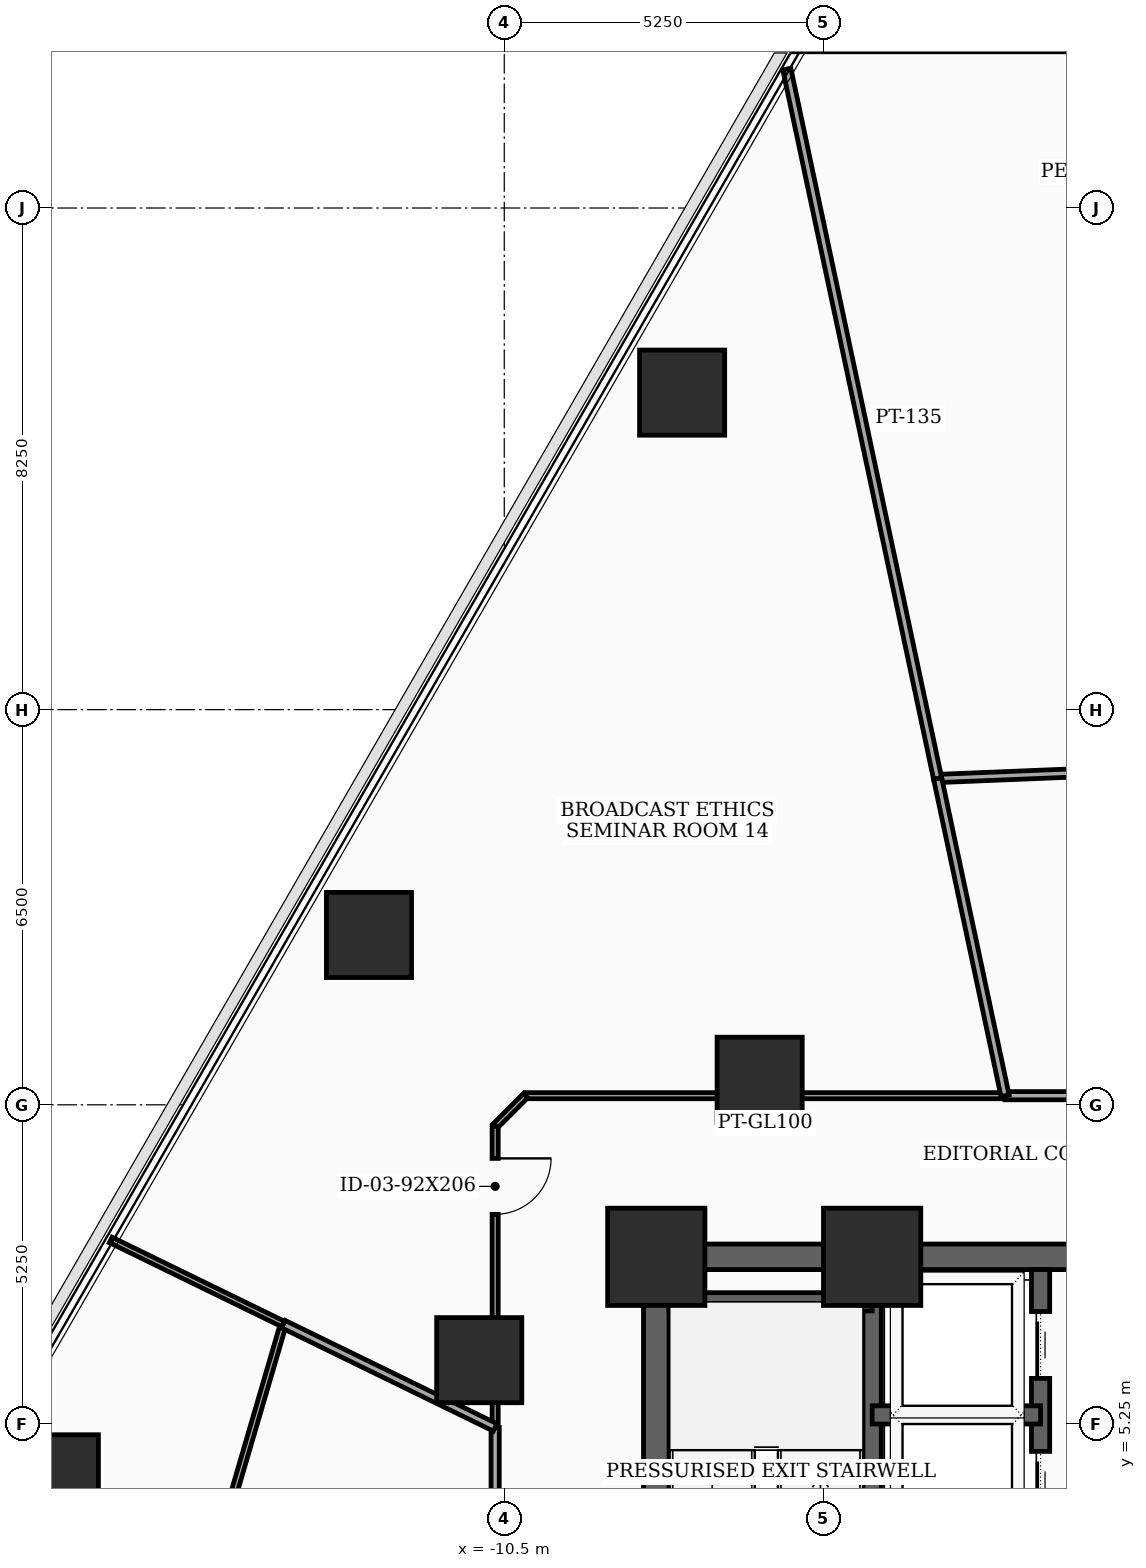
"""IFC4 building model, lengths in metres.
Left out: names, types, materials, properties, quantities, classifications, styles, units other than length and angle.
Written with IfcOpenShell. Run it as: python <this file> out.ifc"""

import sys

from ifc_helpers import new_model, si_unit, direction, frame, frame_2d, origin, origin_2d, place, context, subcontext, project, spatial, rectangle, extrude, element, fill, save


model = new_model("IFC4")
c1 = context("Model", 3, precision=1e-05, world=origin(), true_north=direction((0.0, 1.0)))
c2 = subcontext(c1, "Body", "Model", "MODEL_VIEW")
j1 = project(units=[si_unit("LENGTHUNIT", "METRE"), si_unit("PLANEANGLEUNIT", "RADIAN")], contexts=[c1])
p1 = place(None, origin())
s1 = spatial("IfcSite", under=j1, at=p1, CompositionType="ELEMENT")
p2 = place(p1, origin())
s2 = spatial("IfcBuilding", under=s1, at=p2, CompositionType="ELEMENT")
p3 = place(p2, frame((0.0, 0.0, 51.9)))
s3 = spatial("IfcBuildingStorey", under=s2, at=p3, CompositionType="ELEMENT", Elevation=51.9)
for number, where, z_axis, x_axis in (
    (1, (-4.45, 8.0, 0.0), (0.0, 0.0, 1.0), (1.0, 0.0, 0.0)),
    (2, (-8.0, 8.0, 0.0), (0.0, 0.0, 1.0), (1.0, 0.0, 0.0)),
):
    element("IfcColumn", number, at=place(p3, frame(where, z_axis=z_axis, x_axis=x_axis)), inside=s3, PredefinedType="COLUMN", context=c2, shape_type="SweptSolid", body=[
        extrude(rectangle(XDim=1.6, YDim=1.6, at=origin_2d()), origin(), (0.0, 0.0, 1.0), 3.7),
    ])
for number, where, z_axis, x_axis in (
    (3, (-6.3, 10.912, 0.0), (0.0, 0.0, 1.0), (1.0, 0.0, 0.0)),
    (4, (-10.912, 6.3, 0.0), (0.0, 0.0, 1.0), (1.0, 0.0, 0.0)),
    (5, (-7.575, 22.213, 0.0), (0.0, 0.0, 1.0), (1.0, 0.0, 0.0)),
    (6, (-12.725, 13.293, 0.0), (0.0, 0.0, 1.0), (1.0, 0.0, 0.0)),
    (7, (-17.875, 4.373, 0.0), (0.0, 0.0, 1.0), (1.0, 0.0, 0.0)),
):
    element("IfcColumn", number, at=place(p3, frame(where, z_axis=z_axis, x_axis=x_axis)), inside=s3, PredefinedType="COLUMN", context=c2, shape_type="SweptSolid", body=[
        extrude(rectangle(XDim=1.4, YDim=1.4, at=origin_2d()), origin(), (0.0, 0.0, 1.0), 3.7),
    ])
p4 = place(p3, frame((-8.0, -8.0, 0.0), z_axis=(0.0, 0.0, 1.0), x_axis=(0.0, 1.0, 0.0)))
e8 = element("IfcWall", 8, at=p4, inside=s3, PredefinedType="SHEAR", context=c2, shape_type="SweptSolid", body=[
    extrude(rectangle(XDim=16.0, YDim=0.42, at=frame_2d((8.0, 0.0))), origin(), (0.0, 0.0, 1.0), 3.5),
])
p5 = place(p4, frame((1.002, 0.0, 0.0)))
e9 = element("IfcOpeningElement", 9, at=p5, cuts=e8, PredefinedType="OPENING", context=c2, shape_type="SweptSolid", body=[
    extrude(rectangle(XDim=0.85, YDim=2.02, at=frame_2d((0.425, 1.01))), frame((0.0, 0.22, 0.0), z_axis=(0.0, -1.0, 0.0), x_axis=(1.0, 0.0, 0.0)), (0.0, 0.0, 1.0), 0.44),
])
p6 = place(p4, frame((5.35, 0.0, 0.0)))
e10 = element("IfcOpeningElement", 10, at=p6, cuts=e8, PredefinedType="OPENING", context=c2, shape_type="SweptSolid", body=[
    extrude(rectangle(XDim=1.05, YDim=2.15, at=frame_2d((0.525, 1.075))), frame((0.0, 0.22, 0.0), z_axis=(0.0, -1.0, 0.0), x_axis=(1.0, 0.0, 0.0)), (0.0, 0.0, 1.0), 0.44),
])
p7 = place(p3, frame((-8.0, 8.0, 0.0), z_axis=(0.0, 0.0, 1.0), x_axis=(1.0, 0.0, 0.0)))
e11 = element("IfcWall", 11, at=p7, inside=s3, PredefinedType="SHEAR", context=c2, shape_type="SweptSolid", body=[
    extrude(rectangle(XDim=16.0, YDim=0.42, at=frame_2d((8.0, 0.0))), origin(), (0.0, 0.0, 1.0), 3.5),
])
p8 = place(p7, frame((7.1, 0.0, 0.0)))
e12 = element("IfcOpeningElement", 12, at=p8, cuts=e11, PredefinedType="OPENING", context=c2, shape_type="SweptSolid", body=[
    extrude(rectangle(XDim=1.8, YDim=2.15, at=frame_2d((0.9, 1.075))), frame((0.0, 0.22, 0.0), z_axis=(0.0, -1.0, 0.0), x_axis=(1.0, 0.0, 0.0)), (0.0, 0.0, 1.0), 0.44),
])
p9 = place(p3, frame((-4.45, -7.79, 0.0), z_axis=(0.0, 0.0, 1.0), x_axis=(0.0, 1.0, 0.0)))
e13 = element("IfcWall", 13, at=p9, inside=s3, PredefinedType="SHEAR", context=c2, shape_type="SweptSolid", body=[
    extrude(rectangle(XDim=15.58, YDim=0.3, at=frame_2d((7.79, 0.0))), origin(), (0.0, 0.0, 1.0), 3.5),
])
p10 = place(p3, frame((-7.79, 7.26, 0.0), z_axis=(0.0, 0.0, 1.0), x_axis=(1.0, 0.0, 0.0)))
e14 = element("IfcWall", 14, at=p10, inside=s3, PredefinedType="SHEAR", context=c2, shape_type="SweptSolid", body=[
    extrude(rectangle(XDim=3.34, YDim=0.3, at=frame_2d((1.67, 0.0))), origin(), (0.0, 0.0, 1.0), 3.5),
])
p11 = place(p3, frame((-1.68, -4.85, 0.0), z_axis=(0.0, 0.0, 1.0), x_axis=(0.0, 1.0, 0.0)))
e15 = element("IfcWall", 15, at=p11, inside=s3, PredefinedType="SHEAR", context=c2, shape_type="SweptSolid", body=[
    extrude(rectangle(XDim=12.64, YDim=0.3, at=frame_2d((6.32, 0.0))), origin(), (0.0, 0.0, 1.0), 3.5),
])
p12 = place(p11, frame((3.95, 0.0, 0.0)))
e16 = element("IfcOpeningElement", 16, at=p12, cuts=e15, PredefinedType="OPENING", context=c2, shape_type="SweptSolid", body=[
    extrude(rectangle(XDim=1.1, YDim=2.1, at=frame_2d((0.55, 1.05))), frame((0.0, 0.16, 0.0), z_axis=(0.0, -1.0, 0.0), x_axis=(1.0, 0.0, 0.0)), (0.0, 0.0, 1.0), 0.32),
])
p13 = place(p11, frame((6.25, 0.0, 0.0)))
e17 = element("IfcOpeningElement", 17, at=p13, cuts=e15, PredefinedType="OPENING", context=c2, shape_type="SweptSolid", body=[
    extrude(rectangle(XDim=1.1, YDim=2.1, at=frame_2d((0.55, 1.05))), frame((0.0, 0.16, 0.0), z_axis=(0.0, -1.0, 0.0), x_axis=(1.0, 0.0, 0.0)), (0.0, 0.0, 1.0), 0.32),
])
p14 = place(p11, frame((8.55, 0.0, 0.0)))
e18 = element("IfcOpeningElement", 18, at=p14, cuts=e15, PredefinedType="OPENING", context=c2, shape_type="SweptSolid", body=[
    extrude(rectangle(XDim=1.1, YDim=2.1, at=frame_2d((0.55, 1.05))), frame((0.0, 0.16, 0.0), z_axis=(0.0, -1.0, 0.0), x_axis=(1.0, 0.0, 0.0)), (0.0, 0.0, 1.0), 0.32),
])
p15 = place(p11, frame((10.85, 0.0, 0.0)))
e19 = element("IfcOpeningElement", 19, at=p15, cuts=e15, PredefinedType="OPENING", context=c2, shape_type="SweptSolid", body=[
    extrude(rectangle(XDim=1.1, YDim=2.1, at=frame_2d((0.55, 1.05))), frame((0.0, 0.16, 0.0), z_axis=(0.0, -1.0, 0.0), x_axis=(1.0, 0.0, 0.0)), (0.0, 0.0, 1.0), 0.32),
])
p16 = place(p11, frame((0.45, 0.0, 0.0)))
e20 = element("IfcOpeningElement", 20, at=p16, cuts=e15, PredefinedType="OPENING", context=c2, shape_type="SweptSolid", body=[
    extrude(rectangle(XDim=0.85, YDim=2.02, at=frame_2d((0.425, 1.01))), frame((0.0, 0.16, 0.0), z_axis=(0.0, -1.0, 0.0), x_axis=(1.0, 0.0, 0.0)), (0.0, 0.0, 1.0), 0.32),
])
p17 = place(p11, frame((2.05, 0.0, 0.0)))
e21 = element("IfcOpeningElement", 21, at=p17, cuts=e15, PredefinedType="OPENING", context=c2, shape_type="SweptSolid", body=[
    extrude(rectangle(XDim=0.85, YDim=2.02, at=frame_2d((0.425, 1.01))), frame((0.0, 0.16, 0.0), z_axis=(0.0, -1.0, 0.0), x_axis=(1.0, 0.0, 0.0)), (0.0, 0.0, 1.0), 0.32),
])
p18 = place(p3, frame((-4.45, 5.4, 0.0), z_axis=(0.0, 0.0, 1.0), x_axis=(1.0, 0.0, 0.0)))
e22 = element("IfcWall", 22, at=p18, inside=s3, PredefinedType="SHEAR", context=c2, shape_type="SweptSolid", body=[
    extrude(rectangle(XDim=2.77, YDim=0.3, at=frame_2d((1.385, 0.0))), origin(), (0.0, 0.0, 1.0), 3.5),
])
p19 = place(p3, frame((1.715, 10.65, 0.0), z_axis=(0.0, 0.0, 1.0), x_axis=(-1.0, 0.0, 0.0)))
e23 = element("IfcWall", 23, at=p19, inside=s3, PredefinedType="PARTITIONING", context=c2, shape_type="SweptSolid", body=[
    extrude(rectangle(XDim=3.979, YDim=0.135, at=frame_2d((1.99, 0.0))), origin(), (0.0, 0.0, 1.0), 2.785),
])
p20 = place(p3, frame((-10.65, 5.194, 0.0), z_axis=(0.0, 0.0, 1.0), x_axis=(0.0, -1.0, 0.0)))
e24 = element("IfcWall", 24, at=p20, inside=s3, PredefinedType="PARTITIONING", context=c2, shape_type="SweptSolid", body=[
    extrude(rectangle(XDim=6.909, YDim=0.135, at=frame_2d((3.455, 0.0))), origin(), (0.0, 0.0, 1.0), 2.785),
])
p21 = place(p20, frame((2.979, 0.0, 0.0)))
e25 = element("IfcOpeningElement", 25, at=p21, cuts=e24, PredefinedType="OPENING", context=c2, shape_type="SweptSolid", body=[
    extrude(rectangle(XDim=0.95, YDim=2.1, at=frame_2d((0.475, 1.05))), frame((0.0, 0.077, 0.0), z_axis=(0.0, -1.0, 0.0), x_axis=(1.0, 0.0, 0.0)), (0.0, 0.0, 1.0), 0.155),
])
p22 = place(p3, frame((-2.264, 10.65, 0.0), z_axis=(0.0, 0.0, 1.0), x_axis=(-1.0, 0.0, 0.0)))
e26 = element("IfcWall", 26, at=p22, inside=s3, PredefinedType="MOVABLE", context=c2, shape_type="SweptSolid", body=[
    extrude(rectangle(XDim=7.886, YDim=0.1, at=frame_2d((3.943, 0.0))), origin(), (0.0, 0.0, 1.0), 2.085),
])
p23 = place(p3, frame((-10.15, 10.65, 0.0), z_axis=(0.0, 0.0, 1.0), x_axis=(-0.707106781187, -0.707106781187, 0.0)))
e27 = element("IfcWall", 27, at=p23, inside=s3, PredefinedType="MOVABLE", context=c2, shape_type="SweptSolid", body=[
    extrude(rectangle(XDim=0.707, YDim=0.1, at=frame_2d((0.354, 0.0))), origin(), (0.0, 0.0, 1.0), 3.5),
])
p24 = place(p3, frame((-10.65, 10.15, 0.0), z_axis=(0.0, 0.0, 1.0), x_axis=(0.0, -1.0, 0.0)))
e28 = element("IfcWall", 28, at=p24, inside=s3, PredefinedType="MOVABLE", context=c2, shape_type="SweptSolid", body=[
    extrude(rectangle(XDim=4.956, YDim=0.1, at=frame_2d((2.478, 0.0))), origin(), (0.0, 0.0, 1.0), 2.085),
])
p25 = place(p24, frame((0.531, 0.0, 0.0)))
e29 = element("IfcOpeningElement", 29, at=p25, cuts=e28, PredefinedType="OPENING", context=c2, shape_type="SweptSolid", body=[
    extrude(rectangle(XDim=0.92, YDim=2.035, at=frame_2d((0.46, 1.018))), frame((0.0, 0.06, 0.0), z_axis=(0.0, -1.0, 0.0), x_axis=(1.0, 0.0, 0.0)), (0.0, 0.0, 1.0), 0.12),
])
p26 = place(p3, frame((-3.373, 15.867, 0.0), z_axis=(0.0, 0.0, 1.0), x_axis=(0.999166982533, 0.040808589988, 0.0)))
e30 = element("IfcWall", 30, at=p26, inside=s3, PredefinedType="PARTITIONING", context=c2, shape_type="SweptSolid", body=[
    extrude(rectangle(XDim=5.881, YDim=0.135, at=frame_2d((2.94, 0.0))), origin(), (0.0, 0.0, 1.0), 2.085),
])
p27 = place(p3, frame((-5.854, 27.535, 0.0), z_axis=(0.0, 0.0, 1.0), x_axis=(0.207936838286, -0.978142255137, 0.0)))
e31 = element("IfcWall", 31, at=p27, inside=s3, PredefinedType="PARTITIONING", context=c2, shape_type="SweptSolid", body=[
    extrude(rectangle(XDim=11.929, YDim=0.135, at=frame_2d((5.964, 0.0))), origin(), (0.0, 0.0, 1.0), 2.085),
])
p28 = place(p3, frame((-3.373, 15.867, 0.0), z_axis=(0.0, 0.0, 1.0), x_axis=(0.20795017925, -0.978139418974, 0.0)))
e32 = element("IfcWall", 32, at=p28, inside=s3, PredefinedType="PARTITIONING", context=c2, shape_type="SweptSolid", body=[
    extrude(rectangle(XDim=5.334, YDim=0.135, at=frame_2d((2.667, 0.0))), origin(), (0.0, 0.0, 1.0), 2.785),
])
p29 = place(p3, frame((-15.736, 1.423, 0.0), z_axis=(0.0, 0.0, 1.0), x_axis=(0.281231672123, 0.959639904649, 0.0)))
e33 = element("IfcWall", 33, at=p29, inside=s3, PredefinedType="MOVABLE", context=c2, shape_type="SweptSolid", body=[
    extrude(rectangle(XDim=5.7, YDim=0.1, at=frame_2d((2.85, 0.0))), origin(), (0.0, 0.0, 1.0), 2.085),
])
p30 = place(p3, frame((-14.133, 6.893, 0.0), z_axis=(0.0, 0.0, 1.0), x_axis=(-0.898789989557, 0.438379464245, 0.0)))
e34 = element("IfcWall", 34, at=p30, inside=s3, PredefinedType="MOVABLE", context=c2, shape_type="SweptSolid", body=[
    extrude(rectangle(XDim=3.158, YDim=0.1, at=frame_2d((1.579, 0.0))), origin(), (0.0, 0.0, 1.0), 2.085),
])
p31 = place(p3, frame((-10.65, 5.194, 0.0), z_axis=(0.0, 0.0, 1.0), x_axis=(-0.898781159743, 0.438397567159, 0.0)))
e35 = element("IfcWall", 35, at=p31, inside=s3, PredefinedType="PARTITIONING", context=c2, shape_type="SweptSolid", body=[
    extrude(rectangle(XDim=3.875, YDim=0.135, at=frame_2d((1.938, 0.0))), origin(), (0.0, 0.0, 1.0), 2.785),
])
p32 = place(p14, origin())
e36 = element("IfcDoor", 36, at=p32, inside=s3, OperationType="SLIDING_TO_LEFT", PredefinedType="DOOR", context=c2, shape_type="SweptSolid", body=[
    extrude(rectangle(XDim=1.1, YDim=2.1, at=frame_2d((0.55, 1.05))), frame((0.0, 0.025, 0.0), z_axis=(0.0, -1.0, 0.0), x_axis=(1.0, 0.0, 0.0)), (0.0, 0.0, 1.0), 0.05),
])
fill(e18, e36)
p33 = place(p15, origin())
e37 = element("IfcDoor", 37, at=p33, inside=s3, OperationType="SLIDING_TO_LEFT", PredefinedType="DOOR", context=c2, shape_type="SweptSolid", body=[
    extrude(rectangle(XDim=1.1, YDim=2.1, at=frame_2d((0.55, 1.05))), frame((0.0, 0.025, 0.0), z_axis=(0.0, -1.0, 0.0), x_axis=(1.0, 0.0, 0.0)), (0.0, 0.0, 1.0), 0.05),
])
fill(e19, e37)
p34 = place(p25, origin())
e38 = element("IfcDoor", 38, at=p34, inside=s3, OperationType="SINGLE_SWING_LEFT", PredefinedType="DOOR", context=c2, shape_type="SweptSolid", body=[
    extrude(rectangle(XDim=0.92, YDim=2.035, at=frame_2d((0.46, 1.018))), frame((0.0, 0.025, 0.0), z_axis=(0.0, -1.0, 0.0), x_axis=(1.0, 0.0, 0.0)), (0.0, 0.0, 1.0), 0.05),
])
fill(e29, e38)
save(model, sys.argv[1])
